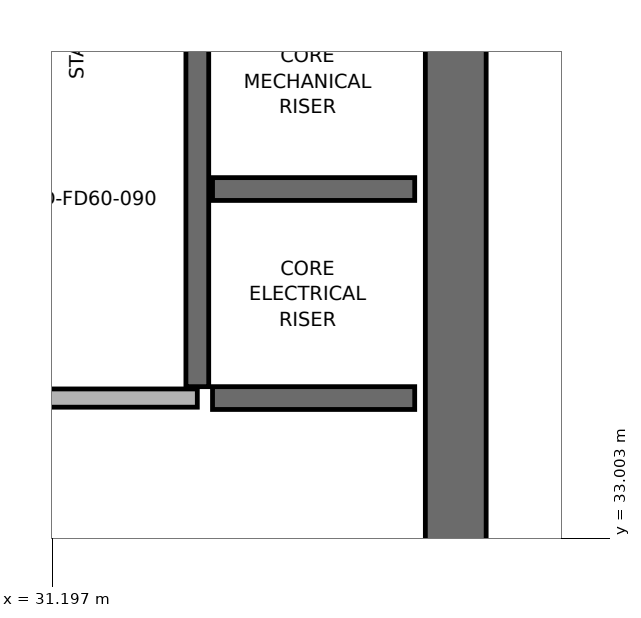
"""IFC4 building model, lengths in metres.
Left out: names, types, materials, properties, quantities, classifications, styles, units other than length and angle.
Written with IfcOpenShell. Run it as: python <this file> out.ifc"""

import sys

from ifc_helpers import new_model, si_unit, direction, frame, frame_2d, origin, place, context, subcontext, project, spatial, rectangle, extrude, element, save


model = new_model("IFC4")
c1 = context("Model", 3, precision=1e-05, world=origin(), true_north=direction((0.0, 1.0)))
c2 = subcontext(c1, "Body", "Model", "MODEL_VIEW")
j1 = project(units=[si_unit("LENGTHUNIT", "METRE"), si_unit("PLANEANGLEUNIT", "RADIAN")], contexts=[c1])
p1 = place(None, origin())
s1 = spatial("IfcSite", under=j1, at=p1, CompositionType="ELEMENT")
p2 = place(p1, origin())
s2 = spatial("IfcBuilding", under=s1, at=p2, CompositionType="ELEMENT")
p3 = place(p2, frame((0.0, 0.0, 373.8)))
s3 = spatial("IfcBuildingStorey", under=s2, at=p3, CompositionType="ELEMENT", Elevation=373.8)
p4 = place(p3, frame((33.85, 20.4, 0.0), z_axis=(0.0, 0.0, 1.0), x_axis=(0.0, 1.0, 0.0)))
e1 = element("IfcWall", 1, at=p4, inside=s3, PredefinedType="SHEAR", context=c2, shape_type="SweptSolid", body=[
    extrude(rectangle(XDim=16.8, YDim=0.4, at=frame_2d((8.4, 0.0))), origin(), (0.0, 0.0, 1.0), 4.8),
])
p5 = place(p3, frame((32.15, 34.0, 0.0), z_axis=(0.0, 0.0, 1.0), x_axis=(0.0, 1.0, 0.0)))
e2 = element("IfcWall", 2, at=p5, inside=s3, PredefinedType="SHEAR", context=c2, shape_type="SweptSolid", body=[
    extrude(rectangle(XDim=3.2, YDim=0.15, at=frame_2d((1.6, 0.0))), origin(), (0.0, 0.0, 1.0), 4.5),
])
for number, where, z_axis, x_axis in (
    (3, (32.25, 33.925, 0.0), (0.0, 0.0, 1.0), (1.0, 0.0, 0.0)),
    (4, (32.25, 35.3, 0.0), (0.0, 0.0, 1.0), (1.0, 0.0, 0.0)),
):
    element("IfcWall", number, at=place(p3, frame(where, z_axis=z_axis, x_axis=x_axis)), inside=s3, PredefinedType="SHEAR", context=c2, shape_type="SweptSolid", body=[
        extrude(rectangle(XDim=1.33, YDim=0.15, at=frame_2d((0.665, 0.0))), origin(), (0.0, 0.0, 1.0), 4.5),
    ])
p6 = place(p3, frame((30.5, 33.925, 0.0), z_axis=(0.0, 0.0, 1.0), x_axis=(1.0, 0.0, 0.0)))
e5 = element("IfcWall", 5, at=p6, inside=s3, PredefinedType="PARTITIONING", context=c2, shape_type="SweptSolid", body=[
    extrude(rectangle(XDim=1.65, YDim=0.12, at=frame_2d((0.825, 0.0))), origin(), (0.0, 0.0, 1.0), 4.5),
])
save(model, sys.argv[1])
